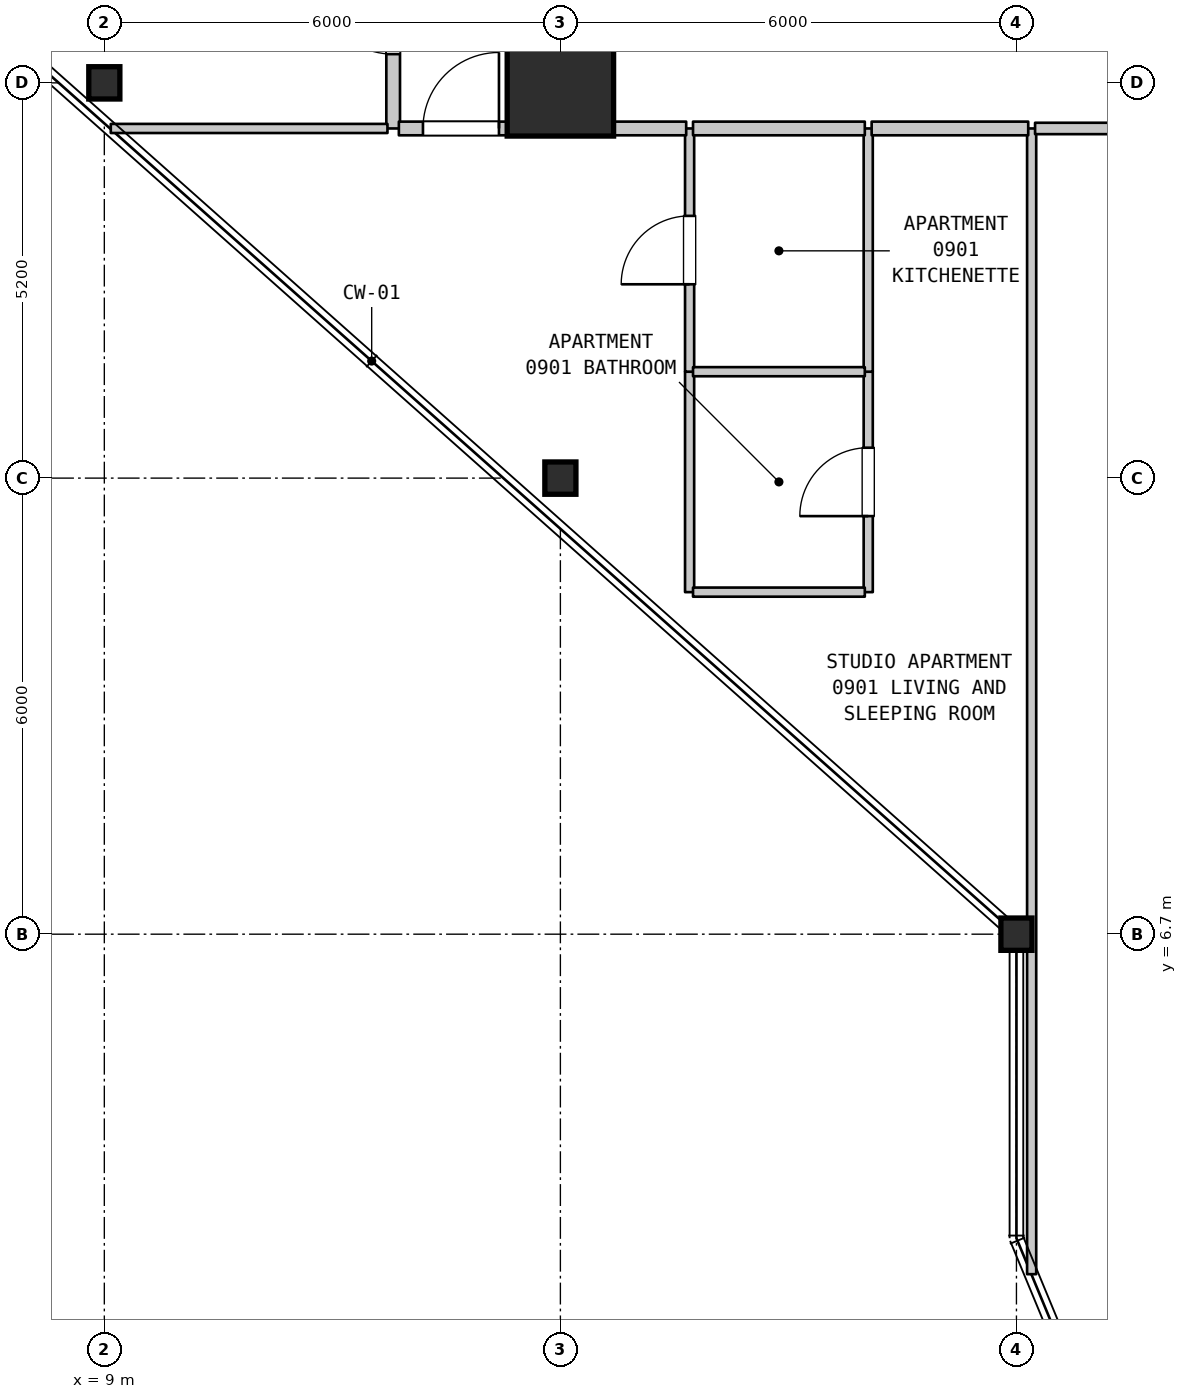
"""IFC4 building model, lengths in metres.
Left out: names, types, materials, properties, quantities, classifications, styles, units other than length and angle.
Written with IfcOpenShell. Run it as: python <this file> out.ifc"""

import sys

from ifc_helpers import new_model, si_unit, direction, frame, frame_2d, origin, origin_2d, place, context, subcontext, project, spatial, rectangle, i_section, extrude, element, fill, save


model = new_model("IFC4")
c1 = context("Model", 3, precision=1e-05, world=origin(), true_north=direction((0.0, 1.0)))
c2 = subcontext(c1, "Body", "Model", "MODEL_VIEW")
j1 = project(units=[si_unit("LENGTHUNIT", "METRE"), si_unit("PLANEANGLEUNIT", "RADIAN")], contexts=[c1])
p1 = place(None, origin())
s1 = spatial("IfcSite", under=j1, at=p1, CompositionType="ELEMENT")
p2 = place(p1, origin())
s2 = spatial("IfcBuilding", under=s1, at=p2, CompositionType="ELEMENT")
p3 = place(p2, frame((0.0, 0.0, 42.5)))
s3 = spatial("IfcBuildingStorey", under=s2, at=p3, CompositionType="ELEMENT", Elevation=42.5)
for number, where, z_axis, x_axis in (
    (1, (9.0, 17.9, 0.0), (0.0, 0.0, 1.0), (1.0, 0.0, 0.0)),
    (2, (15.0, 12.7, 0.0), (0.0, 0.0, 1.0), (1.0, 0.0, 0.0)),
):
    element("IfcColumn", number, at=place(p3, frame(where, z_axis=z_axis, x_axis=x_axis)), inside=s3, PredefinedType="COLUMN", context=c2, shape_type="SweptSolid", body=[
        extrude(i_section(OverallWidth=0.409, OverallDepth=0.425, WebThickness=0.032, FlangeThickness=0.052, FilletRadius=0.015, at=origin_2d()), origin(), (0.0, 0.0, 1.0), 3.7),
    ])
p4 = place(p3, frame((15.0, 17.9, 0.0), z_axis=(0.0, 0.0, 1.0), x_axis=(1.0, 0.0, 0.0)))
e3 = element("IfcColumn", 3, at=p4, inside=s3, PredefinedType="COLUMN", context=c2, shape_type="SweptSolid", body=[
    extrude(rectangle(XDim=1.4, YDim=1.4, at=origin_2d()), origin(), (0.0, 0.0, 1.0), 3.7),
])
p5 = place(p3, frame((21.0, 6.7, 0.0), z_axis=(0.0, 0.0, 1.0), x_axis=(1.0, 0.0, 0.0)))
e4 = element("IfcColumn", 4, at=p5, inside=s3, PredefinedType="COLUMN", context=c2, shape_type="SweptSolid", body=[
    extrude(i_section(OverallWidth=0.409, OverallDepth=0.425, WebThickness=0.032, FlangeThickness=0.052, FilletRadius=0.015, at=origin_2d()), origin(), (0.0, 0.0, 1.0), 3.7),
])
p6 = place(p3, frame((12.8, 17.3, 0.0), z_axis=(0.0, 0.0, 1.0), x_axis=(0.0, 1.0, 0.0)))
e5 = element("IfcWall", 5, at=p6, inside=s3, PredefinedType="STANDARD", context=c2, shape_type="SweptSolid", body=[
    extrude(rectangle(XDim=3.1, YDim=0.18, at=frame_2d((1.55, 0.0))), origin(), (0.0, 0.0, 1.0), 3.385),
])
p7 = place(p6, frame((0.978, 0.0, 0.0)))
e6 = element("IfcOpeningElement", 6, at=p7, cuts=e5, PredefinedType="OPENING", context=c2, shape_type="SweptSolid", body=[
    extrude(rectangle(XDim=1.0, YDim=2.15, at=frame_2d((0.5, 1.075))), frame((0.0, 0.1, 0.0), z_axis=(0.0, -1.0, 0.0), x_axis=(1.0, 0.0, 0.0)), (0.0, 0.0, 1.0), 0.2),
])
p8 = place(p3, frame((16.7, 11.2, 0.0), z_axis=(0.0, 0.0, 1.0), x_axis=(0.0, 1.0, 0.0)))
e7 = element("IfcWall", 7, at=p8, inside=s3, PredefinedType="PARTITIONING", context=c2, shape_type="SweptSolid", body=[
    extrude(rectangle(XDim=2.9, YDim=0.12, at=frame_2d((1.45, 0.0))), origin(), (0.0, 0.0, 1.0), 3.385),
])
p9 = place(p3, frame((16.7, 14.1, 0.0), z_axis=(0.0, 0.0, 1.0), x_axis=(0.0, 1.0, 0.0)))
e8 = element("IfcWall", 8, at=p9, inside=s3, PredefinedType="PARTITIONING", context=c2, shape_type="SweptSolid", body=[
    extrude(rectangle(XDim=3.2, YDim=0.12, at=frame_2d((1.6, 0.0))), origin(), (0.0, 0.0, 1.0), 3.385),
])
p10 = place(p9, frame((1.15, 0.0, 0.0)))
e9 = element("IfcOpeningElement", 9, at=p10, cuts=e8, PredefinedType="OPENING", context=c2, shape_type="SweptSolid", body=[
    extrude(rectangle(XDim=0.9, YDim=2.15, at=frame_2d((0.45, 1.075))), frame((0.0, 0.07, 0.0), z_axis=(0.0, -1.0, 0.0), x_axis=(1.0, 0.0, 0.0)), (0.0, 0.0, 1.0), 0.14),
])
p11 = place(p3, frame((19.05, 11.2, 0.0), z_axis=(0.0, 0.0, 1.0), x_axis=(0.0, 1.0, 0.0)))
e10 = element("IfcWall", 10, at=p11, inside=s3, PredefinedType="PARTITIONING", context=c2, shape_type="SweptSolid", body=[
    extrude(rectangle(XDim=2.9, YDim=0.12, at=frame_2d((1.45, 0.0))), origin(), (0.0, 0.0, 1.0), 3.385),
])
p12 = place(p11, frame((1.0, 0.0, 0.0)))
e11 = element("IfcOpeningElement", 11, at=p12, cuts=e10, PredefinedType="OPENING", context=c2, shape_type="SweptSolid", body=[
    extrude(rectangle(XDim=0.9, YDim=2.1, at=frame_2d((0.45, 1.05))), frame((0.0, 0.07, 0.0), z_axis=(0.0, -1.0, 0.0), x_axis=(1.0, 0.0, 0.0)), (0.0, 0.0, 1.0), 0.14),
])
p13 = place(p3, frame((19.05, 14.1, 0.0), z_axis=(0.0, 0.0, 1.0), x_axis=(0.0, 1.0, 0.0)))
e12 = element("IfcWall", 12, at=p13, inside=s3, PredefinedType="PARTITIONING", context=c2, shape_type="SweptSolid", body=[
    extrude(rectangle(XDim=3.2, YDim=0.12, at=frame_2d((1.6, 0.0))), origin(), (0.0, 0.0, 1.0), 3.385),
])
p14 = place(p3, frame((21.2, 2.227, 0.0), z_axis=(0.0, 0.0, 1.0), x_axis=(0.0, 1.0, 0.0)))
e13 = element("IfcWall", 13, at=p14, inside=s3, PredefinedType="PARTITIONING", context=c2, shape_type="SweptSolid", body=[
    extrude(rectangle(XDim=15.073, YDim=0.12, at=frame_2d((7.537, 0.0))), origin(), (0.0, 0.0, 1.0), 3.385),
])
for number, where, z_axis, x_axis in (
    (14, (16.745, 11.2, 0.0), (0.0, 0.0, 1.0), (1.0, 0.0, 0.0)),
    (15, (16.745, 14.1, 0.0), (0.0, 0.0, 1.0), (1.0, 0.0, 0.0)),
):
    element("IfcWall", number, at=place(p3, frame(where, z_axis=z_axis, x_axis=x_axis)), inside=s3, PredefinedType="PARTITIONING", context=c2, shape_type="SweptSolid", body=[
        extrude(rectangle(XDim=2.26, YDim=0.12, at=frame_2d((1.13, 0.0))), origin(), (0.0, 0.0, 1.0), 3.385),
    ])
p15 = place(p3, frame((9.085, 17.3, 0.0), z_axis=(0.0, 0.0, 1.0), x_axis=(1.0, 0.0, 0.0)))
e16 = element("IfcWall", 16, at=p15, inside=s3, PredefinedType="PARTITIONING", context=c2, shape_type="SweptSolid", body=[
    extrude(rectangle(XDim=3.64, YDim=0.12, at=frame_2d((1.82, 0.0))), origin(), (0.0, 0.0, 1.0), 3.385),
])
p16 = place(p3, frame((12.875, 17.3, 0.0), z_axis=(0.0, 0.0, 1.0), x_axis=(1.0, 0.0, 0.0)))
e17 = element("IfcWall", 17, at=p16, inside=s3, PredefinedType="STANDARD", context=c2, shape_type="SweptSolid", body=[
    extrude(rectangle(XDim=3.78, YDim=0.18, at=frame_2d((1.89, 0.0))), origin(), (0.0, 0.0, 1.0), 3.385),
])
p17 = place(p16, frame((0.317, 0.0, 0.0)))
e18 = element("IfcOpeningElement", 18, at=p17, cuts=e17, PredefinedType="OPENING", context=c2, shape_type="SweptSolid", body=[
    extrude(rectangle(XDim=1.0, YDim=2.15, at=frame_2d((0.5, 1.075))), frame((0.0, 0.1, 0.0), z_axis=(0.0, -1.0, 0.0), x_axis=(1.0, 0.0, 0.0)), (0.0, 0.0, 1.0), 0.2),
])
p18 = place(p3, frame((16.745, 17.3, 0.0), z_axis=(0.0, 0.0, 1.0), x_axis=(1.0, 0.0, 0.0)))
e19 = element("IfcWall", 19, at=p18, inside=s3, PredefinedType="STANDARD", context=c2, shape_type="SweptSolid", body=[
    extrude(rectangle(XDim=2.26, YDim=0.18, at=frame_2d((1.13, 0.0))), origin(), (0.0, 0.0, 1.0), 3.385),
])
p19 = place(p3, frame((19.095, 17.3, 0.0), z_axis=(0.0, 0.0, 1.0), x_axis=(1.0, 0.0, 0.0)))
e20 = element("IfcWall", 20, at=p19, inside=s3, PredefinedType="STANDARD", context=c2, shape_type="SweptSolid", body=[
    extrude(rectangle(XDim=2.06, YDim=0.18, at=frame_2d((1.03, 0.0))), origin(), (0.0, 0.0, 1.0), 3.385),
])
p20 = place(p3, frame((21.245, 17.3, 0.0), z_axis=(0.0, 0.0, 1.0), x_axis=(1.0, 0.0, 0.0)))
e21 = element("IfcWall", 21, at=p20, inside=s3, PredefinedType="STANDARD", context=c2, shape_type="SweptSolid", body=[
    extrude(rectangle(XDim=4.91, YDim=0.15, at=frame_2d((2.455, 0.0))), origin(), (0.0, 0.0, 1.0), 3.385),
])
p21 = place(p20, frame((1.884, 0.0, 0.0)))
e22 = element("IfcOpeningElement", 22, at=p21, cuts=e21, PredefinedType="OPENING", context=c2, shape_type="SweptSolid", body=[
    extrude(rectangle(XDim=1.0, YDim=2.15, at=frame_2d((0.5, 1.075))), frame((0.0, 0.085, 0.0), z_axis=(0.0, -1.0, 0.0), x_axis=(1.0, 0.0, 0.0)), (0.0, 0.0, 1.0), 0.17),
])
p22 = place(p7, origin())
e23 = element("IfcDoor", 23, at=p22, inside=s3, OperationType="SINGLE_SWING_RIGHT", PredefinedType="DOOR", context=c2, shape_type="SweptSolid", body=[
    extrude(rectangle(XDim=1.0, YDim=2.15, at=frame_2d((0.5, 1.075))), frame((0.0, 0.025, 0.0), z_axis=(0.0, -1.0, 0.0), x_axis=(1.0, 0.0, 0.0)), (0.0, 0.0, 1.0), 0.05),
])
fill(e6, e23)
p23 = place(p10, origin())
e24 = element("IfcDoor", 24, at=p23, inside=s3, OperationType="SINGLE_SWING_LEFT", PredefinedType="DOOR", context=c2, shape_type="SweptSolid", body=[
    extrude(rectangle(XDim=0.9, YDim=2.15, at=frame_2d((0.45, 1.075))), frame((0.0, 0.025, 0.0), z_axis=(0.0, -1.0, 0.0), x_axis=(1.0, 0.0, 0.0)), (0.0, 0.0, 1.0), 0.05),
])
fill(e9, e24)
p24 = place(p12, origin())
e25 = element("IfcDoor", 25, at=p24, inside=s3, OperationType="SINGLE_SWING_LEFT", PredefinedType="DOOR", context=c2, shape_type="SweptSolid", body=[
    extrude(rectangle(XDim=0.9, YDim=2.1, at=frame_2d((0.45, 1.05))), frame((0.0, 0.025, 0.0), z_axis=(0.0, -1.0, 0.0), x_axis=(1.0, 0.0, 0.0)), (0.0, 0.0, 1.0), 0.05),
])
fill(e11, e25)
p25 = place(p17, origin())
e26 = element("IfcDoor", 26, at=p25, inside=s3, OperationType="SINGLE_SWING_RIGHT", PredefinedType="DOOR", context=c2, shape_type="SweptSolid", body=[
    extrude(rectangle(XDim=1.0, YDim=2.15, at=frame_2d((0.5, 1.075))), frame((0.0, 0.025, 0.0), z_axis=(0.0, -1.0, 0.0), x_axis=(1.0, 0.0, 0.0)), (0.0, 0.0, 1.0), 0.05),
])
fill(e18, e26)
save(model, sys.argv[1])
